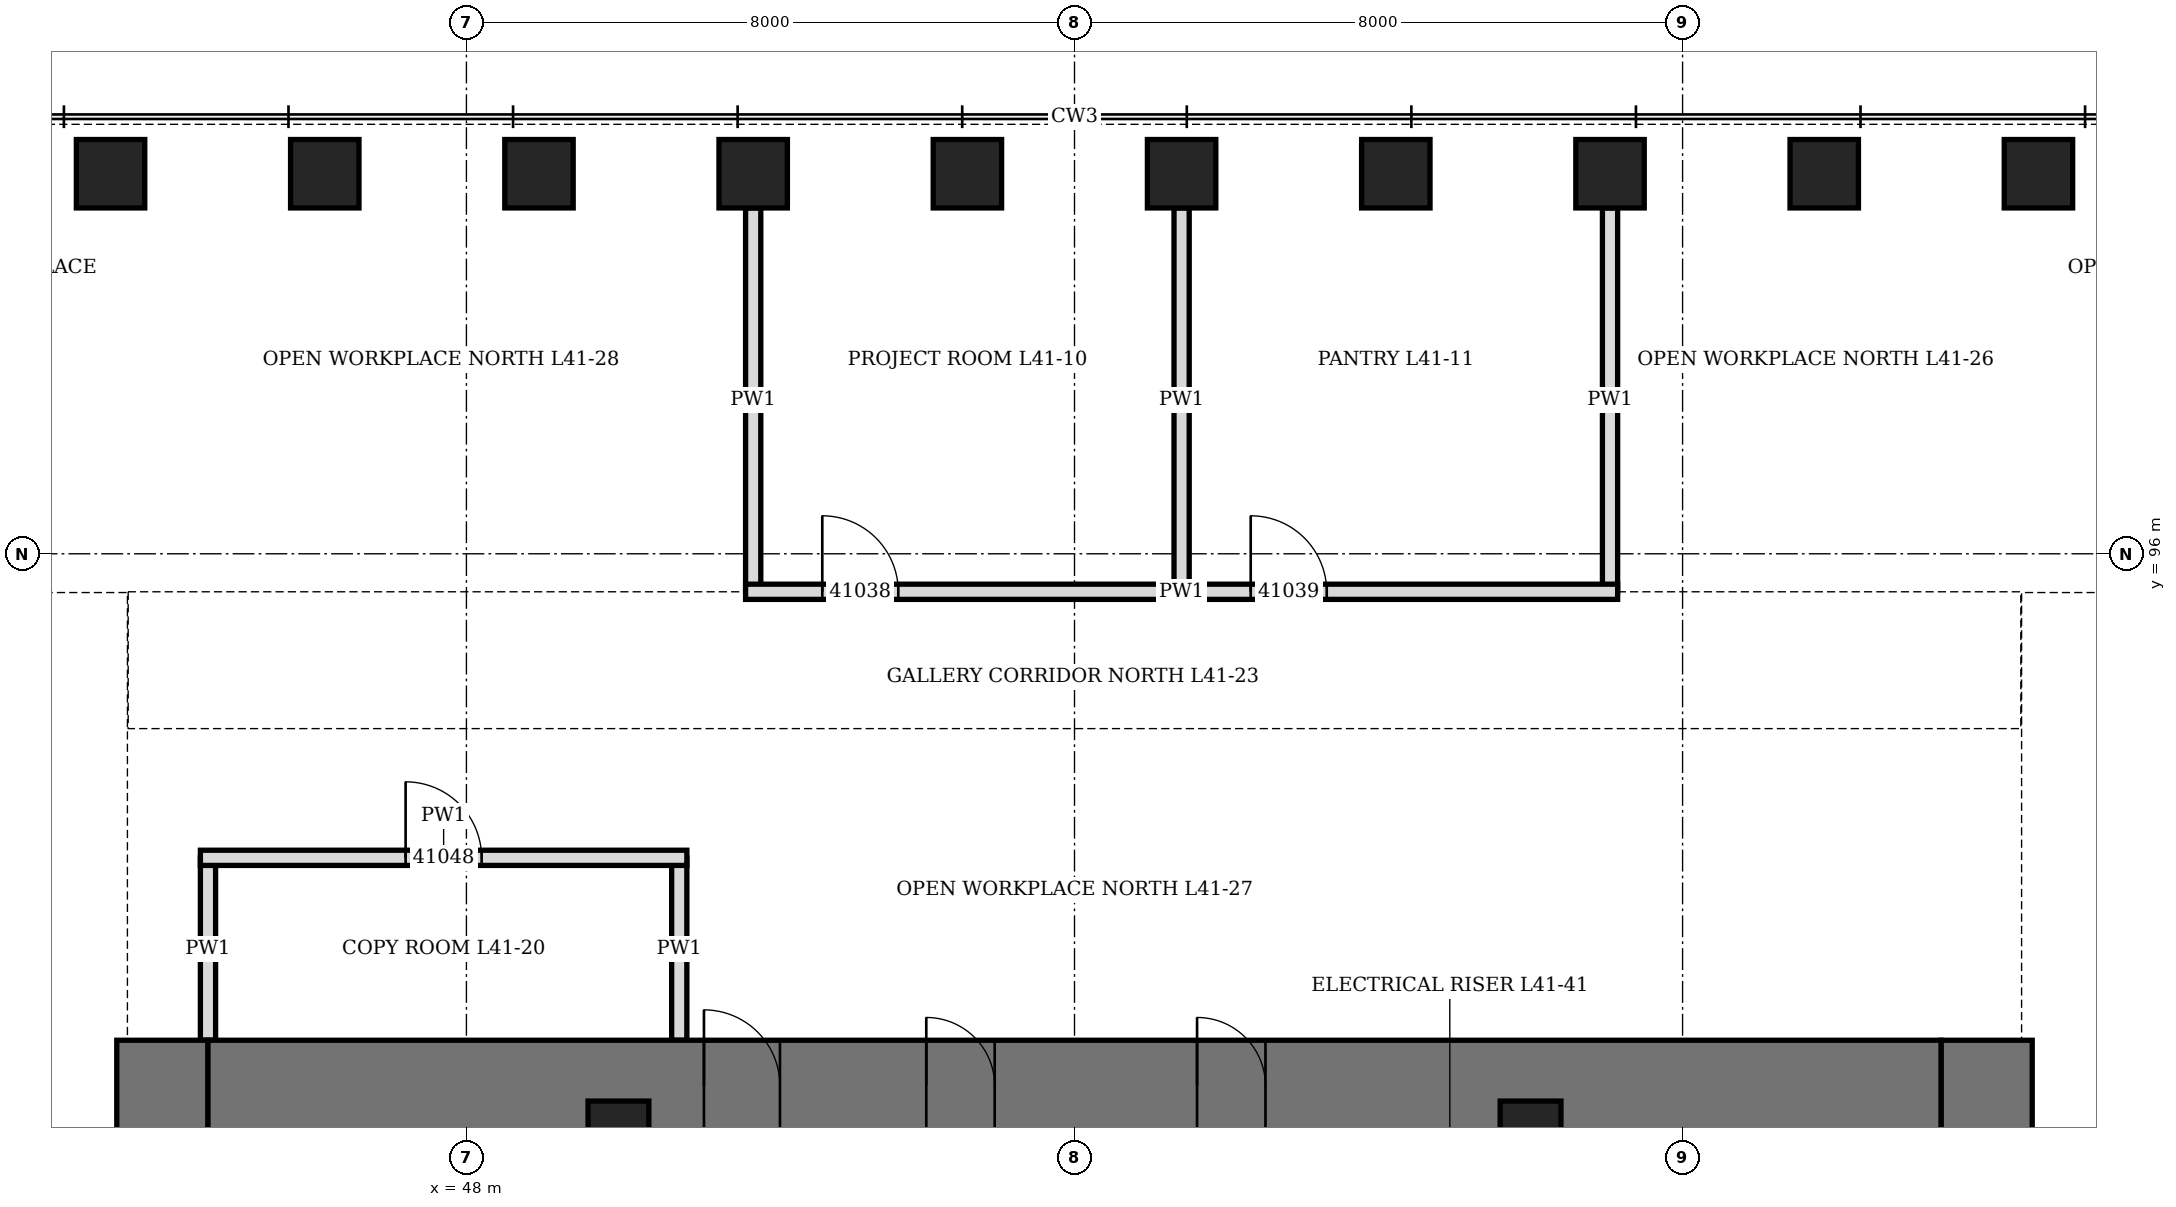
"""IFC4 building model, lengths in metres.
Left out: names, types, materials, properties, quantities, classifications, styles, units other than length and angle.
Written with IfcOpenShell. Run it as: python <this file> out.ifc"""

import sys

from ifc_helpers import new_model, si_unit, direction, frame, frame_2d, origin, origin_2d, place, context, subcontext, project, spatial, rectangle, hollow_rectangle, extrude, element, fill, save


model = new_model("IFC4")
c1 = context("Model", 3, precision=1e-05, world=origin(), true_north=direction((0.0, 1.0)))
c2 = subcontext(c1, "Body", "Model", "MODEL_VIEW")
j1 = project(units=[si_unit("LENGTHUNIT", "METRE"), si_unit("PLANEANGLEUNIT", "RADIAN")], contexts=[c1])
p1 = place(None, origin())
s1 = spatial("IfcSite", under=j1, at=p1, CompositionType="ELEMENT")
p2 = place(p1, origin())
s2 = spatial("IfcBuilding", under=s1, at=p2, CompositionType="ELEMENT")
p3 = place(p2, frame((0.0, 0.0, 185.5)))
s3 = spatial("IfcBuildingStorey", under=s2, at=p3, CompositionType="ELEMENT", Elevation=185.5)
for number, where, z_axis, x_axis in (
    (1, (68.682, 101.0, 0.0), (0.0, 0.0, 1.0), (1.0, 0.0, 0.0)),
    (2, (65.864, 101.0, 0.0), (0.0, 0.0, 1.0), (1.0, 0.0, 0.0)),
    (3, (63.045, 101.0, 0.0), (0.0, 0.0, 1.0), (1.0, 0.0, 0.0)),
    (4, (60.227, 101.0, 0.0), (0.0, 0.0, 1.0), (1.0, 0.0, 0.0)),
    (5, (57.409, 101.0, 0.0), (0.0, 0.0, 1.0), (1.0, 0.0, 0.0)),
    (6, (54.591, 101.0, 0.0), (0.0, 0.0, 1.0), (1.0, 0.0, 0.0)),
    (7, (51.773, 101.0, 0.0), (0.0, 0.0, 1.0), (1.0, 0.0, 0.0)),
    (8, (48.955, 101.0, 0.0), (0.0, 0.0, 1.0), (1.0, 0.0, 0.0)),
    (9, (46.136, 101.0, 0.0), (0.0, 0.0, 1.0), (1.0, 0.0, 0.0)),
    (10, (43.318, 101.0, 0.0), (0.0, 0.0, 1.0), (1.0, 0.0, 0.0)),
):
    element("IfcColumn", number, at=place(p3, frame(where, z_axis=z_axis, x_axis=x_axis)), inside=s3, PredefinedType="COLUMN", context=c2, shape_type="SweptSolid", body=[
        extrude(hollow_rectangle(XDim=0.9, YDim=0.9, WallThickness=0.12, at=origin_2d()), origin(), (0.0, 0.0, 1.0), 4.2),
    ])
p4 = place(p3, frame((44.0, 70.4, 0.0), z_axis=(0.0, 0.0, 1.0), x_axis=(0.0, 1.0, 0.0)))
e11 = element("IfcWall", 11, at=p4, inside=s3, PredefinedType="SHEAR", context=c2, shape_type="SweptSolid", body=[
    extrude(rectangle(XDim=19.2, YDim=1.2, at=frame_2d((9.6, 0.0))), origin(), (0.0, 0.0, 1.0), 4.2),
])
p5 = place(p4, frame((8.6, 0.0, 0.0)))
e12 = element("IfcOpeningElement", 12, at=p5, cuts=e11, PredefinedType="OPENING", context=c2, shape_type="SweptSolid", body=[
    extrude(rectangle(XDim=2.0, YDim=2.4, at=frame_2d((1.0, 1.2))), frame((0.0, 0.61, 0.0), z_axis=(0.0, -1.0, 0.0), x_axis=(1.0, 0.0, 0.0)), (0.0, 0.0, 1.0), 1.22),
])
p6 = place(p3, frame((68.0, 70.4, 0.0), z_axis=(0.0, 0.0, 1.0), x_axis=(0.0, 1.0, 0.0)))
e13 = element("IfcWall", 13, at=p6, inside=s3, PredefinedType="SHEAR", context=c2, shape_type="SweptSolid", body=[
    extrude(rectangle(XDim=19.2, YDim=1.2, at=frame_2d((9.6, 0.0))), origin(), (0.0, 0.0, 1.0), 4.2),
])
p7 = place(p6, frame((8.6, 0.0, 0.0)))
e14 = element("IfcOpeningElement", 14, at=p7, cuts=e13, PredefinedType="OPENING", context=c2, shape_type="SweptSolid", body=[
    extrude(rectangle(XDim=2.0, YDim=2.4, at=frame_2d((1.0, 1.2))), frame((0.0, 0.61, 0.0), z_axis=(0.0, -1.0, 0.0), x_axis=(1.0, 0.0, 0.0)), (0.0, 0.0, 1.0), 1.22),
])
p8 = place(p3, frame((44.6, 89.0, 0.0), z_axis=(0.0, 0.0, 1.0), x_axis=(1.0, 0.0, 0.0)))
e15 = element("IfcWall", 15, at=p8, inside=s3, PredefinedType="SHEAR", context=c2, shape_type="SweptSolid", body=[
    extrude(rectangle(XDim=22.8, YDim=1.2, at=frame_2d((11.4, 0.0))), origin(), (0.0, 0.0, 1.0), 4.2),
])
p9 = place(p8, frame((6.525, 0.0, 0.0)))
e16 = element("IfcOpeningElement", 16, at=p9, cuts=e15, PredefinedType="OPENING", context=c2, shape_type="SweptSolid", body=[
    extrude(rectangle(XDim=1.0, YDim=2.1, at=frame_2d((0.5, 1.05))), frame((0.0, 0.61, 0.0), z_axis=(0.0, -1.0, 0.0), x_axis=(1.0, 0.0, 0.0)), (0.0, 0.0, 1.0), 1.22),
])
p10 = place(p8, frame((9.45, 0.0, 0.0)))
e17 = element("IfcOpeningElement", 17, at=p10, cuts=e15, PredefinedType="OPENING", context=c2, shape_type="SweptSolid", body=[
    extrude(rectangle(XDim=0.9, YDim=2.1, at=frame_2d((0.45, 1.05))), frame((0.0, 0.61, 0.0), z_axis=(0.0, -1.0, 0.0), x_axis=(1.0, 0.0, 0.0)), (0.0, 0.0, 1.0), 1.22),
])
p11 = place(p8, frame((13.012, 0.0, 0.0)))
e18 = element("IfcOpeningElement", 18, at=p11, cuts=e15, PredefinedType="OPENING", context=c2, shape_type="SweptSolid", body=[
    extrude(rectangle(XDim=0.9, YDim=2.1, at=frame_2d((0.45, 1.05))), frame((0.0, 0.61, 0.0), z_axis=(0.0, -1.0, 0.0), x_axis=(1.0, 0.0, 0.0)), (0.0, 0.0, 1.0), 1.22),
])
for number, where, z_axis, x_axis in (
    (19, (50.0, 88.4, 0.0), (0.0, 0.0, 1.0), (1.0, 0.0, 0.0)),
    (20, (62.0, 88.4, 0.0), (0.0, 0.0, 1.0), (1.0, 0.0, 0.0)),
):
    element("IfcColumn", number, at=place(p3, frame(where, z_axis=z_axis, x_axis=x_axis)), inside=s3, PredefinedType="COLUMN", context=c2, shape_type="SweptSolid", body=[
        extrude(hollow_rectangle(XDim=0.8, YDim=0.8, WallThickness=0.1, at=origin_2d()), origin(), (0.0, 0.0, 1.0), 4.2),
    ])
for number, where, z_axis, x_axis in (
    (21, (51.773, 95.5, 0.0), (0.0, 0.0, 1.0), (0.0, 1.0, 0.0)),
    (22, (57.409, 95.5, 0.0), (0.0, 0.0, 1.0), (0.0, 1.0, 0.0)),
    (23, (63.045, 95.5, 0.0), (0.0, 0.0, 1.0), (0.0, 1.0, 0.0)),
):
    element("IfcWall", number, at=place(p3, frame(where, z_axis=z_axis, x_axis=x_axis)), inside=s3, PredefinedType="PARTITIONING", context=c2, shape_type="SweptSolid", body=[
        extrude(rectangle(XDim=5.05, YDim=0.2, at=frame_2d((2.525, 0.0))), origin(), (0.0, 0.0, 1.0), 3.428),
    ])
for number, where, z_axis, x_axis in (
    (24, (44.6, 89.6, 0.0), (0.0, 0.0, 1.0), (0.0, 1.0, 0.0)),
    (25, (50.8, 89.6, 0.0), (0.0, 0.0, 1.0), (0.0, 1.0, 0.0)),
):
    element("IfcWall", number, at=place(p3, frame(where, z_axis=z_axis, x_axis=x_axis)), inside=s3, PredefinedType="PARTITIONING", context=c2, shape_type="SweptSolid", body=[
        extrude(rectangle(XDim=2.4, YDim=0.2, at=frame_2d((1.2, 0.0))), origin(), (0.0, 0.0, 1.0), 4.04),
    ])
p12 = place(p3, frame((44.5, 92.0, 0.0), z_axis=(0.0, 0.0, 1.0), x_axis=(1.0, 0.0, 0.0)))
e26 = element("IfcWall", 26, at=p12, inside=s3, PredefinedType="PARTITIONING", context=c2, shape_type="SweptSolid", body=[
    extrude(rectangle(XDim=6.4, YDim=0.2, at=frame_2d((3.2, 0.0))), origin(), (0.0, 0.0, 1.0), 4.04),
])
p13 = place(p12, frame((2.7, 0.0, 0.0)))
e27 = element("IfcOpeningElement", 27, at=p13, cuts=e26, PredefinedType="OPENING", context=c2, shape_type="SweptSolid", body=[
    extrude(rectangle(XDim=1.0, YDim=2.1, at=frame_2d((0.5, 1.05))), frame((0.0, 0.11, 0.0), z_axis=(0.0, -1.0, 0.0), x_axis=(1.0, 0.0, 0.0)), (0.0, 0.0, 1.0), 0.22),
])
p14 = place(p3, frame((51.673, 95.5, 0.0), z_axis=(0.0, 0.0, 1.0), x_axis=(1.0, 0.0, 0.0)))
e28 = element("IfcWall", 28, at=p14, inside=s3, PredefinedType="PARTITIONING", context=c2, shape_type="SweptSolid", body=[
    extrude(rectangle(XDim=11.473, YDim=0.2, at=frame_2d((5.736, 0.0))), origin(), (0.0, 0.0, 1.0), 4.04),
])
p15 = place(p14, frame((1.009, 0.0, 0.0)))
e29 = element("IfcOpeningElement", 29, at=p15, cuts=e28, PredefinedType="OPENING", context=c2, shape_type="SweptSolid", body=[
    extrude(rectangle(XDim=1.0, YDim=2.1, at=frame_2d((0.5, 1.05))), frame((0.0, 0.11, 0.0), z_axis=(0.0, -1.0, 0.0), x_axis=(1.0, 0.0, 0.0)), (0.0, 0.0, 1.0), 0.22),
])
p16 = place(p14, frame((6.646, 0.0, 0.0)))
e30 = element("IfcOpeningElement", 30, at=p16, cuts=e28, PredefinedType="OPENING", context=c2, shape_type="SweptSolid", body=[
    extrude(rectangle(XDim=1.0, YDim=2.1, at=frame_2d((0.5, 1.05))), frame((0.0, 0.11, 0.0), z_axis=(0.0, -1.0, 0.0), x_axis=(1.0, 0.0, 0.0)), (0.0, 0.0, 1.0), 0.22),
])
p17 = place(p9, origin())
e31 = element("IfcDoor", 31, at=p17, inside=s3, OperationType="SINGLE_SWING_LEFT", PredefinedType="DOOR", context=c2, shape_type="SweptSolid", body=[
    extrude(rectangle(XDim=1.0, YDim=2.1, at=frame_2d((0.5, 1.05))), frame((0.0, 0.35, 0.0), z_axis=(0.0, -1.0, 0.0), x_axis=(1.0, 0.0, 0.0)), (0.0, 0.0, 1.0), 0.7),
])
fill(e16, e31)
p18 = place(p10, origin())
e32 = element("IfcDoor", 32, at=p18, inside=s3, OperationType="SINGLE_SWING_LEFT", PredefinedType="DOOR", context=c2, shape_type="SweptSolid", body=[
    extrude(rectangle(XDim=0.9, YDim=2.1, at=frame_2d((0.45, 1.05))), frame((0.0, 0.35, 0.0), z_axis=(0.0, -1.0, 0.0), x_axis=(1.0, 0.0, 0.0)), (0.0, 0.0, 1.0), 0.7),
])
fill(e17, e32)
p19 = place(p11, origin())
e33 = element("IfcDoor", 33, at=p19, inside=s3, OperationType="SINGLE_SWING_LEFT", PredefinedType="DOOR", context=c2, shape_type="SweptSolid", body=[
    extrude(rectangle(XDim=0.9, YDim=2.1, at=frame_2d((0.45, 1.05))), frame((0.0, 0.35, 0.0), z_axis=(0.0, -1.0, 0.0), x_axis=(1.0, 0.0, 0.0)), (0.0, 0.0, 1.0), 0.7),
])
fill(e18, e33)
p20 = place(p15, origin())
e34 = element("IfcDoor", 34, at=p20, inside=s3, OperationType="SINGLE_SWING_LEFT", PredefinedType="DOOR", context=c2, shape_type="SweptSolid", body=[
    extrude(rectangle(XDim=1.0, YDim=2.1, at=frame_2d((0.5, 1.05))), frame((0.0, 0.1, 0.0), z_axis=(0.0, -1.0, 0.0), x_axis=(1.0, 0.0, 0.0)), (0.0, 0.0, 1.0), 0.199),
])
fill(e29, e34)
p21 = place(p16, origin())
e35 = element("IfcDoor", 35, at=p21, inside=s3, OperationType="SINGLE_SWING_LEFT", PredefinedType="DOOR", context=c2, shape_type="SweptSolid", body=[
    extrude(rectangle(XDim=1.0, YDim=2.1, at=frame_2d((0.5, 1.05))), frame((0.0, 0.1, 0.0), z_axis=(0.0, -1.0, 0.0), x_axis=(1.0, 0.0, 0.0)), (0.0, 0.0, 1.0), 0.199),
])
fill(e30, e35)
p22 = place(p13, origin())
e36 = element("IfcDoor", 36, at=p22, inside=s3, OperationType="SINGLE_SWING_LEFT", PredefinedType="DOOR", context=c2, shape_type="SweptSolid", body=[
    extrude(rectangle(XDim=1.0, YDim=2.1, at=frame_2d((0.5, 1.05))), frame((0.0, 0.1, 0.0), z_axis=(0.0, -1.0, 0.0), x_axis=(1.0, 0.0, 0.0)), (0.0, 0.0, 1.0), 0.199),
])
fill(e27, e36)
save(model, sys.argv[1])
